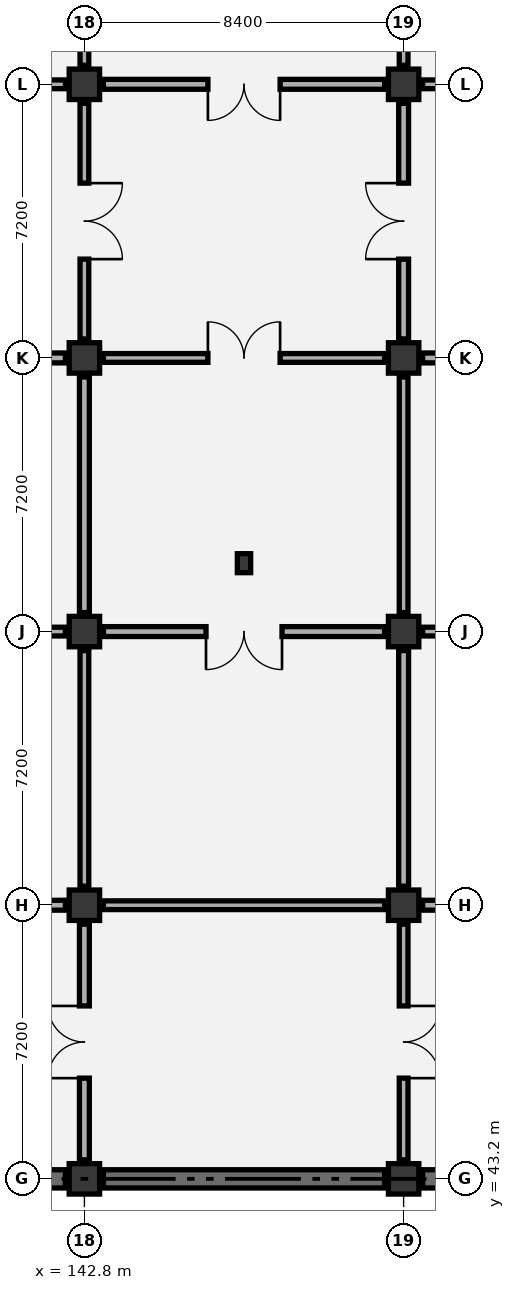
"""IFC4 building model, lengths in metres.
Left out: names, types, materials, properties, quantities, classifications, styles, units other than length and angle.
Written with IfcOpenShell. Run it as: python <this file> out.ifc"""

import sys

from ifc_helpers import new_model, si_unit, direction, frame, frame_2d, origin, origin_2d, place, context, subcontext, project, spatial, rectangle, extrude, element, fill, save


model = new_model("IFC4")
c1 = context("Model", 3, precision=1e-05, world=origin(), true_north=direction((0.0, 1.0)))
c2 = subcontext(c1, "Body", "Model", "MODEL_VIEW")
j1 = project(units=[si_unit("LENGTHUNIT", "METRE"), si_unit("PLANEANGLEUNIT", "RADIAN")], contexts=[c1])
p1 = place(None, origin())
s1 = spatial("IfcSite", under=j1, at=p1, CompositionType="ELEMENT")
p2 = place(p1, origin())
s2 = spatial("IfcBuilding", under=s1, at=p2, CompositionType="ELEMENT")
p3 = place(p2, frame((0.0, 0.0, -4.8)))
s3 = spatial("IfcBuildingStorey", under=s2, at=p3, CompositionType="ELEMENT", Elevation=-4.8)
for number, where, z_axis, x_axis in (
    (1, (142.8, 43.2, 0.0), (0.0, 0.0, 1.0), (1.0, 0.0, 0.0)),
    (2, (142.8, 50.4, 0.0), (0.0, 0.0, 1.0), (1.0, 0.0, 0.0)),
    (3, (142.8, 57.6, 0.0), (0.0, 0.0, 1.0), (1.0, 0.0, 0.0)),
    (4, (142.8, 64.8, 0.0), (0.0, 0.0, 1.0), (1.0, 0.0, 0.0)),
    (5, (142.8, 72.0, 0.0), (0.0, 0.0, 1.0), (1.0, 0.0, 0.0)),
    (6, (151.2, 43.2, 0.0), (0.0, 0.0, 1.0), (1.0, 0.0, 0.0)),
    (7, (151.2, 50.4, 0.0), (0.0, 0.0, 1.0), (1.0, 0.0, 0.0)),
    (8, (151.2, 57.6, 0.0), (0.0, 0.0, 1.0), (1.0, 0.0, 0.0)),
    (9, (151.2, 64.8, 0.0), (0.0, 0.0, 1.0), (1.0, 0.0, 0.0)),
    (10, (151.2, 72.0, 0.0), (0.0, 0.0, 1.0), (1.0, 0.0, 0.0)),
):
    element("IfcColumn", number, at=place(p3, frame(where, z_axis=z_axis, x_axis=x_axis)), inside=s3, PredefinedType="COLUMN", context=c2, shape_type="SweptSolid", body=[
        extrude(rectangle(XDim=0.8, YDim=0.8, at=origin_2d()), origin(), (0.0, 0.0, 1.0), 4.8),
    ])
p4 = place(p3, frame((147.0, 59.4, 0.0), z_axis=(0.0, 0.0, 1.0), x_axis=(1.0, 0.0, 0.0)))
e11 = element("IfcColumn", 11, at=p4, inside=s3, PredefinedType="PILASTER", context=c2, shape_type="SweptSolid", body=[
    extrude(rectangle(XDim=0.35, YDim=0.5, at=origin_2d()), origin(), (0.0, 0.0, 1.0), 4.8),
])
p5 = place(p3, frame((134.9, 43.2, 0.0), z_axis=(0.0, 0.0, 1.0), x_axis=(1.0, 0.0, 0.0)))
e12 = element("IfcWall", 12, at=p5, inside=s3, PredefinedType="USERDEFINED", context=c2, shape_type="SweptSolid", body=[
    extrude(rectangle(XDim=7.4, YDim=0.48, at=frame_2d((3.7, 0.0))), origin(), (0.0, 0.0, 1.0), 4.45),
])
p6 = place(p3, frame((143.3, 43.2, 0.0), z_axis=(0.0, 0.0, 1.0), x_axis=(1.0, 0.0, 0.0)))
e13 = element("IfcWall", 13, at=p6, inside=s3, PredefinedType="USERDEFINED", context=c2, shape_type="SweptSolid", body=[
    extrude(rectangle(XDim=7.4, YDim=0.48, at=frame_2d((3.7, 0.0))), origin(), (0.0, 0.0, 1.0), 4.45),
])
p7 = place(p3, frame((151.7, 43.2, 0.0), z_axis=(0.0, 0.0, 1.0), x_axis=(1.0, 0.0, 0.0)))
e14 = element("IfcWall", 14, at=p7, inside=s3, PredefinedType="USERDEFINED", context=c2, shape_type="SweptSolid", body=[
    extrude(rectangle(XDim=7.4, YDim=0.48, at=frame_2d((3.7, 0.0))), origin(), (0.0, 0.0, 1.0), 4.45),
])
p8 = place(p3, frame((142.8, 43.7, 0.0), z_axis=(0.0, 0.0, 1.0), x_axis=(0.0, 1.0, 0.0)))
e15 = element("IfcWall", 15, at=p8, inside=s3, PredefinedType="PARTITIONING", context=c2, shape_type="SweptSolid", body=[
    extrude(rectangle(XDim=6.2, YDim=0.26, at=frame_2d((3.1, 0.0))), origin(), (0.0, 0.0, 1.0), 3.645),
])
p9 = place(p8, frame((2.15, 0.0, 0.0)))
e16 = element("IfcOpeningElement", 16, at=p9, cuts=e15, PredefinedType="OPENING", context=c2, shape_type="SweptSolid", body=[
    extrude(rectangle(XDim=1.9, YDim=2.3, at=frame_2d((0.95, 1.15))), frame((0.0, 0.14, 0.0), z_axis=(0.0, -1.0, 0.0), x_axis=(1.0, 0.0, 0.0)), (0.0, 0.0, 1.0), 0.28),
])
p10 = place(p3, frame((134.9, 50.4, 0.0), z_axis=(0.0, 0.0, 1.0), x_axis=(1.0, 0.0, 0.0)))
e17 = element("IfcWall", 17, at=p10, inside=s3, PredefinedType="PARTITIONING", context=c2, shape_type="SweptSolid", body=[
    extrude(rectangle(XDim=7.4, YDim=0.26, at=frame_2d((3.7, 0.0))), origin(), (0.0, 0.0, 1.0), 3.545),
])
p11 = place(p3, frame((142.8, 50.9, 0.0), z_axis=(0.0, 0.0, 1.0), x_axis=(0.0, 1.0, 0.0)))
e18 = element("IfcWall", 18, at=p11, inside=s3, PredefinedType="PARTITIONING", context=c2, shape_type="SweptSolid", body=[
    extrude(rectangle(XDim=6.2, YDim=0.23, at=frame_2d((3.1, 0.0))), origin(), (0.0, 0.0, 1.0), 3.645),
])
p12 = place(p3, frame((134.9, 57.6, 0.0), z_axis=(0.0, 0.0, 1.0), x_axis=(1.0, 0.0, 0.0)))
e19 = element("IfcWall", 19, at=p12, inside=s3, PredefinedType="PARTITIONING", context=c2, shape_type="SweptSolid", body=[
    extrude(rectangle(XDim=7.4, YDim=0.23, at=frame_2d((3.7, 0.0))), origin(), (0.0, 0.0, 1.0), 3.545),
])
p13 = place(p12, frame((2.7, 0.0, 0.0)))
e20 = element("IfcOpeningElement", 20, at=p13, cuts=e19, PredefinedType="OPENING", context=c2, shape_type="SweptSolid", body=[
    extrude(rectangle(XDim=2.0, YDim=2.35, at=frame_2d((1.0, 1.175))), frame((0.0, 0.125, 0.0), z_axis=(0.0, -1.0, 0.0), x_axis=(1.0, 0.0, 0.0)), (0.0, 0.0, 1.0), 0.25),
])
p14 = place(p3, frame((142.8, 58.1, 0.0), z_axis=(0.0, 0.0, 1.0), x_axis=(0.0, 1.0, 0.0)))
e21 = element("IfcWall", 21, at=p14, inside=s3, PredefinedType="PARTITIONING", context=c2, shape_type="SweptSolid", body=[
    extrude(rectangle(XDim=6.2, YDim=0.26, at=frame_2d((3.1, 0.0))), origin(), (0.0, 0.0, 1.0), 3.645),
])
p15 = place(p3, frame((134.9, 64.8, 0.0), z_axis=(0.0, 0.0, 1.0), x_axis=(1.0, 0.0, 0.0)))
e22 = element("IfcWall", 22, at=p15, inside=s3, PredefinedType="PARTITIONING", context=c2, shape_type="SweptSolid", body=[
    extrude(rectangle(XDim=7.4, YDim=0.26, at=frame_2d((3.7, 0.0))), origin(), (0.0, 0.0, 1.0), 3.545),
])
p16 = place(p15, frame((2.75, 0.0, 0.0)))
e23 = element("IfcOpeningElement", 23, at=p16, cuts=e22, PredefinedType="OPENING", context=c2, shape_type="SweptSolid", body=[
    extrude(rectangle(XDim=1.9, YDim=2.3, at=frame_2d((0.95, 1.15))), frame((0.0, 0.14, 0.0), z_axis=(0.0, -1.0, 0.0), x_axis=(1.0, 0.0, 0.0)), (0.0, 0.0, 1.0), 0.28),
])
p17 = place(p3, frame((142.8, 65.3, 0.0), z_axis=(0.0, 0.0, 1.0), x_axis=(0.0, 1.0, 0.0)))
e24 = element("IfcWall", 24, at=p17, inside=s3, PredefinedType="PARTITIONING", context=c2, shape_type="SweptSolid", body=[
    extrude(rectangle(XDim=6.2, YDim=0.23, at=frame_2d((3.1, 0.0))), origin(), (0.0, 0.0, 1.0), 3.645),
])
p18 = place(p17, frame((2.1, 0.0, 0.0)))
e25 = element("IfcOpeningElement", 25, at=p18, cuts=e24, PredefinedType="OPENING", context=c2, shape_type="SweptSolid", body=[
    extrude(rectangle(XDim=2.0, YDim=2.35, at=frame_2d((1.0, 1.175))), frame((0.0, 0.125, 0.0), z_axis=(0.0, -1.0, 0.0), x_axis=(1.0, 0.0, 0.0)), (0.0, 0.0, 1.0), 0.25),
])
p19 = place(p3, frame((134.9, 72.0, 0.0), z_axis=(0.0, 0.0, 1.0), x_axis=(1.0, 0.0, 0.0)))
e26 = element("IfcWall", 26, at=p19, inside=s3, PredefinedType="PARTITIONING", context=c2, shape_type="SweptSolid", body=[
    extrude(rectangle(XDim=7.4, YDim=0.23, at=frame_2d((3.7, 0.0))), origin(), (0.0, 0.0, 1.0), 3.545),
])
p20 = place(p19, frame((2.95, 0.0, 0.0)))
e27 = element("IfcOpeningElement", 27, at=p20, cuts=e26, PredefinedType="OPENING", context=c2, shape_type="SweptSolid", body=[
    extrude(rectangle(XDim=1.5, YDim=2.15, at=frame_2d((0.75, 1.075))), frame((0.0, 0.125, 0.0), z_axis=(0.0, -1.0, 0.0), x_axis=(1.0, 0.0, 0.0)), (0.0, 0.0, 1.0), 0.25),
])
p21 = place(p3, frame((142.8, 72.5, 0.0), z_axis=(0.0, 0.0, 1.0), x_axis=(0.0, 1.0, 0.0)))
e28 = element("IfcWall", 28, at=p21, inside=s3, PredefinedType="PARTITIONING", context=c2, shape_type="SweptSolid", body=[
    extrude(rectangle(XDim=6.2, YDim=0.23, at=frame_2d((3.1, 0.0))), origin(), (0.0, 0.0, 1.0), 3.645),
])
p22 = place(p3, frame((151.2, 43.7, 0.0), z_axis=(0.0, 0.0, 1.0), x_axis=(0.0, 1.0, 0.0)))
e29 = element("IfcWall", 29, at=p22, inside=s3, PredefinedType="PARTITIONING", context=c2, shape_type="SweptSolid", body=[
    extrude(rectangle(XDim=6.2, YDim=0.23, at=frame_2d((3.1, 0.0))), origin(), (0.0, 0.0, 1.0), 3.645),
])
p23 = place(p22, frame((2.15, 0.0, 0.0)))
e30 = element("IfcOpeningElement", 30, at=p23, cuts=e29, PredefinedType="OPENING", context=c2, shape_type="SweptSolid", body=[
    extrude(rectangle(XDim=1.9, YDim=2.3, at=frame_2d((0.95, 1.15))), frame((0.0, 0.125, 0.0), z_axis=(0.0, -1.0, 0.0), x_axis=(1.0, 0.0, 0.0)), (0.0, 0.0, 1.0), 0.25),
])
p24 = place(p3, frame((143.3, 50.4, 0.0), z_axis=(0.0, 0.0, 1.0), x_axis=(1.0, 0.0, 0.0)))
e31 = element("IfcWall", 31, at=p24, inside=s3, PredefinedType="PARTITIONING", context=c2, shape_type="SweptSolid", body=[
    extrude(rectangle(XDim=7.4, YDim=0.23, at=frame_2d((3.7, 0.0))), origin(), (0.0, 0.0, 1.0), 3.545),
])
p25 = place(p3, frame((151.2, 50.9, 0.0), z_axis=(0.0, 0.0, 1.0), x_axis=(0.0, 1.0, 0.0)))
e32 = element("IfcWall", 32, at=p25, inside=s3, PredefinedType="PARTITIONING", context=c2, shape_type="SweptSolid", body=[
    extrude(rectangle(XDim=6.2, YDim=0.26, at=frame_2d((3.1, 0.0))), origin(), (0.0, 0.0, 1.0), 3.645),
])
p26 = place(p3, frame((143.3, 57.6, 0.0), z_axis=(0.0, 0.0, 1.0), x_axis=(1.0, 0.0, 0.0)))
e33 = element("IfcWall", 33, at=p26, inside=s3, PredefinedType="PARTITIONING", context=c2, shape_type="SweptSolid", body=[
    extrude(rectangle(XDim=7.4, YDim=0.26, at=frame_2d((3.7, 0.0))), origin(), (0.0, 0.0, 1.0), 3.545),
])
p27 = place(p26, frame((2.7, 0.0, 0.0)))
e34 = element("IfcOpeningElement", 34, at=p27, cuts=e33, PredefinedType="OPENING", context=c2, shape_type="SweptSolid", body=[
    extrude(rectangle(XDim=2.0, YDim=2.35, at=frame_2d((1.0, 1.175))), frame((0.0, 0.14, 0.0), z_axis=(0.0, -1.0, 0.0), x_axis=(1.0, 0.0, 0.0)), (0.0, 0.0, 1.0), 0.28),
])
p28 = place(p3, frame((151.2, 58.1, 0.0), z_axis=(0.0, 0.0, 1.0), x_axis=(0.0, 1.0, 0.0)))
e35 = element("IfcWall", 35, at=p28, inside=s3, PredefinedType="PARTITIONING", context=c2, shape_type="SweptSolid", body=[
    extrude(rectangle(XDim=6.2, YDim=0.23, at=frame_2d((3.1, 0.0))), origin(), (0.0, 0.0, 1.0), 3.645),
])
p29 = place(p3, frame((143.3, 64.8, 0.0), z_axis=(0.0, 0.0, 1.0), x_axis=(1.0, 0.0, 0.0)))
e36 = element("IfcWall", 36, at=p29, inside=s3, PredefinedType="PARTITIONING", context=c2, shape_type="SweptSolid", body=[
    extrude(rectangle(XDim=7.4, YDim=0.23, at=frame_2d((3.7, 0.0))), origin(), (0.0, 0.0, 1.0), 3.545),
])
p30 = place(p29, frame((2.75, 0.0, 0.0)))
e37 = element("IfcOpeningElement", 37, at=p30, cuts=e36, PredefinedType="OPENING", context=c2, shape_type="SweptSolid", body=[
    extrude(rectangle(XDim=1.9, YDim=2.3, at=frame_2d((0.95, 1.15))), frame((0.0, 0.125, 0.0), z_axis=(0.0, -1.0, 0.0), x_axis=(1.0, 0.0, 0.0)), (0.0, 0.0, 1.0), 0.25),
])
p31 = place(p3, frame((151.2, 65.3, 0.0), z_axis=(0.0, 0.0, 1.0), x_axis=(0.0, 1.0, 0.0)))
e38 = element("IfcWall", 38, at=p31, inside=s3, PredefinedType="PARTITIONING", context=c2, shape_type="SweptSolid", body=[
    extrude(rectangle(XDim=6.2, YDim=0.26, at=frame_2d((3.1, 0.0))), origin(), (0.0, 0.0, 1.0), 3.645),
])
p32 = place(p31, frame((2.1, 0.0, 0.0)))
e39 = element("IfcOpeningElement", 39, at=p32, cuts=e38, PredefinedType="OPENING", context=c2, shape_type="SweptSolid", body=[
    extrude(rectangle(XDim=2.0, YDim=2.35, at=frame_2d((1.0, 1.175))), frame((0.0, 0.14, 0.0), z_axis=(0.0, -1.0, 0.0), x_axis=(1.0, 0.0, 0.0)), (0.0, 0.0, 1.0), 0.28),
])
p33 = place(p3, frame((143.3, 72.0, 0.0), z_axis=(0.0, 0.0, 1.0), x_axis=(1.0, 0.0, 0.0)))
e40 = element("IfcWall", 40, at=p33, inside=s3, PredefinedType="PARTITIONING", context=c2, shape_type="SweptSolid", body=[
    extrude(rectangle(XDim=7.4, YDim=0.26, at=frame_2d((3.7, 0.0))), origin(), (0.0, 0.0, 1.0), 3.545),
])
p34 = place(p33, frame((2.75, 0.0, 0.0)))
e41 = element("IfcOpeningElement", 41, at=p34, cuts=e40, PredefinedType="OPENING", context=c2, shape_type="SweptSolid", body=[
    extrude(rectangle(XDim=1.9, YDim=2.3, at=frame_2d((0.95, 1.15))), frame((0.0, 0.14, 0.0), z_axis=(0.0, -1.0, 0.0), x_axis=(1.0, 0.0, 0.0)), (0.0, 0.0, 1.0), 0.28),
])
p35 = place(p3, frame((151.2, 72.5, 0.0), z_axis=(0.0, 0.0, 1.0), x_axis=(0.0, 1.0, 0.0)))
e42 = element("IfcWall", 42, at=p35, inside=s3, PredefinedType="PARTITIONING", context=c2, shape_type="SweptSolid", body=[
    extrude(rectangle(XDim=6.2, YDim=0.23, at=frame_2d((3.1, 0.0))), origin(), (0.0, 0.0, 1.0), 3.645),
])
p36 = place(p3, frame((151.7, 50.4, 0.0), z_axis=(0.0, 0.0, 1.0), x_axis=(1.0, 0.0, 0.0)))
e43 = element("IfcWall", 43, at=p36, inside=s3, PredefinedType="PARTITIONING", context=c2, shape_type="SweptSolid", body=[
    extrude(rectangle(XDim=7.4, YDim=0.26, at=frame_2d((3.7, 0.0))), origin(), (0.0, 0.0, 1.0), 3.545),
])
p37 = place(p3, frame((151.7, 57.6, 0.0), z_axis=(0.0, 0.0, 1.0), x_axis=(1.0, 0.0, 0.0)))
e44 = element("IfcWall", 44, at=p37, inside=s3, PredefinedType="PARTITIONING", context=c2, shape_type="SweptSolid", body=[
    extrude(rectangle(XDim=7.4, YDim=0.23, at=frame_2d((3.7, 0.0))), origin(), (0.0, 0.0, 1.0), 3.545),
])
p38 = place(p37, frame((2.7, 0.0, 0.0)))
e45 = element("IfcOpeningElement", 45, at=p38, cuts=e44, PredefinedType="OPENING", context=c2, shape_type="SweptSolid", body=[
    extrude(rectangle(XDim=2.0, YDim=2.35, at=frame_2d((1.0, 1.175))), frame((0.0, 0.125, 0.0), z_axis=(0.0, -1.0, 0.0), x_axis=(1.0, 0.0, 0.0)), (0.0, 0.0, 1.0), 0.25),
])
p39 = place(p3, frame((151.7, 64.8, 0.0), z_axis=(0.0, 0.0, 1.0), x_axis=(1.0, 0.0, 0.0)))
e46 = element("IfcWall", 46, at=p39, inside=s3, PredefinedType="PARTITIONING", context=c2, shape_type="SweptSolid", body=[
    extrude(rectangle(XDim=7.4, YDim=0.26, at=frame_2d((3.7, 0.0))), origin(), (0.0, 0.0, 1.0), 3.545),
])
p40 = place(p39, frame((2.75, 0.0, 0.0)))
e47 = element("IfcOpeningElement", 47, at=p40, cuts=e46, PredefinedType="OPENING", context=c2, shape_type="SweptSolid", body=[
    extrude(rectangle(XDim=1.9, YDim=2.3, at=frame_2d((0.95, 1.15))), frame((0.0, 0.14, 0.0), z_axis=(0.0, -1.0, 0.0), x_axis=(1.0, 0.0, 0.0)), (0.0, 0.0, 1.0), 0.28),
])
p41 = place(p3, frame((151.7, 72.0, 0.0), z_axis=(0.0, 0.0, 1.0), x_axis=(1.0, 0.0, 0.0)))
e48 = element("IfcWall", 48, at=p41, inside=s3, PredefinedType="PARTITIONING", context=c2, shape_type="SweptSolid", body=[
    extrude(rectangle(XDim=7.4, YDim=0.23, at=frame_2d((3.7, 0.0))), origin(), (0.0, 0.0, 1.0), 3.545),
])
p42 = place(p41, frame((2.75, 0.0, 0.0)))
e49 = element("IfcOpeningElement", 49, at=p42, cuts=e48, PredefinedType="OPENING", context=c2, shape_type="SweptSolid", body=[
    extrude(rectangle(XDim=1.9, YDim=2.3, at=frame_2d((0.95, 1.15))), frame((0.0, 0.125, 0.0), z_axis=(0.0, -1.0, 0.0), x_axis=(1.0, 0.0, 0.0)), (0.0, 0.0, 1.0), 0.25),
])
p43 = place(p9, origin())
e50 = element("IfcDoor", 50, at=p43, inside=s3, OperationType="DOUBLE_DOOR_SINGLE_SWING", PredefinedType="DOOR", context=c2, shape_type="SweptSolid", body=[
    extrude(rectangle(XDim=1.9, YDim=2.3, at=frame_2d((0.95, 1.15))), frame((0.0, 0.025, 0.0), z_axis=(0.0, -1.0, 0.0), x_axis=(1.0, 0.0, 0.0)), (0.0, 0.0, 1.0), 0.05),
])
fill(e16, e50)
p44 = place(p18, frame((2.0, 0.0, 0.0), z_axis=(0.0, 0.0, 1.0), x_axis=(-1.0, 0.0, 0.0)))
e51 = element("IfcDoor", 51, at=p44, inside=s3, OperationType="DOUBLE_DOOR_SINGLE_SWING", PredefinedType="DOOR", context=c2, shape_type="SweptSolid", body=[
    extrude(rectangle(XDim=2.0, YDim=2.35, at=frame_2d((1.0, 1.175))), frame((0.0, 0.025, 0.0), z_axis=(0.0, -1.0, 0.0), x_axis=(1.0, 0.0, 0.0)), (0.0, 0.0, 1.0), 0.05),
])
fill(e25, e51)
p45 = place(p23, frame((1.9, 0.0, 0.0), z_axis=(0.0, 0.0, 1.0), x_axis=(-1.0, 0.0, 0.0)))
e52 = element("IfcDoor", 52, at=p45, inside=s3, OperationType="DOUBLE_DOOR_SINGLE_SWING", PredefinedType="DOOR", context=c2, shape_type="SweptSolid", body=[
    extrude(rectangle(XDim=1.9, YDim=2.3, at=frame_2d((0.95, 1.15))), frame((0.0, 0.025, 0.0), z_axis=(0.0, -1.0, 0.0), x_axis=(1.0, 0.0, 0.0)), (0.0, 0.0, 1.0), 0.05),
])
fill(e30, e52)
p46 = place(p27, frame((2.0, 0.0, 0.0), z_axis=(0.0, 0.0, 1.0), x_axis=(-1.0, 0.0, 0.0)))
e53 = element("IfcDoor", 53, at=p46, inside=s3, OperationType="DOUBLE_DOOR_SINGLE_SWING", PredefinedType="DOOR", context=c2, shape_type="SweptSolid", body=[
    extrude(rectangle(XDim=2.0, YDim=2.35, at=frame_2d((1.0, 1.175))), frame((0.0, 0.025, 0.0), z_axis=(0.0, -1.0, 0.0), x_axis=(1.0, 0.0, 0.0)), (0.0, 0.0, 1.0), 0.05),
])
fill(e34, e53)
p47 = place(p30, origin())
e54 = element("IfcDoor", 54, at=p47, inside=s3, OperationType="DOUBLE_DOOR_SINGLE_SWING", PredefinedType="DOOR", context=c2, shape_type="SweptSolid", body=[
    extrude(rectangle(XDim=1.9, YDim=2.3, at=frame_2d((0.95, 1.15))), frame((0.0, 0.025, 0.0), z_axis=(0.0, -1.0, 0.0), x_axis=(1.0, 0.0, 0.0)), (0.0, 0.0, 1.0), 0.05),
])
fill(e37, e54)
p48 = place(p32, origin())
e55 = element("IfcDoor", 55, at=p48, inside=s3, OperationType="DOUBLE_DOOR_SINGLE_SWING", PredefinedType="DOOR", context=c2, shape_type="SweptSolid", body=[
    extrude(rectangle(XDim=2.0, YDim=2.35, at=frame_2d((1.0, 1.175))), frame((0.0, 0.025, 0.0), z_axis=(0.0, -1.0, 0.0), x_axis=(1.0, 0.0, 0.0)), (0.0, 0.0, 1.0), 0.05),
])
fill(e39, e55)
p49 = place(p34, frame((1.9, 0.0, 0.0), z_axis=(0.0, 0.0, 1.0), x_axis=(-1.0, 0.0, 0.0)))
e56 = element("IfcDoor", 56, at=p49, inside=s3, OperationType="DOUBLE_DOOR_SINGLE_SWING", PredefinedType="DOOR", context=c2, shape_type="SweptSolid", body=[
    extrude(rectangle(XDim=1.9, YDim=2.3, at=frame_2d((0.95, 1.15))), frame((0.0, 0.025, 0.0), z_axis=(0.0, -1.0, 0.0), x_axis=(1.0, 0.0, 0.0)), (0.0, 0.0, 1.0), 0.05),
])
fill(e41, e56)
save(model, sys.argv[1])
